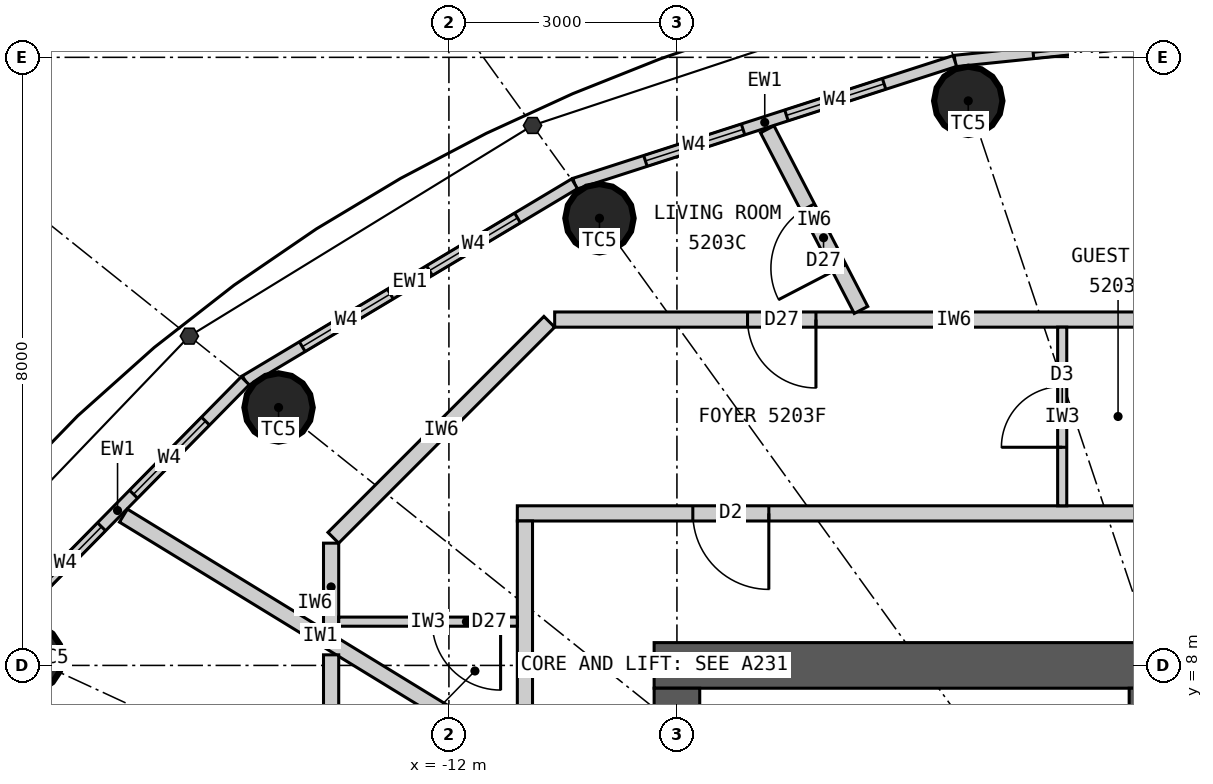
"""IFC4 building model, lengths in metres.
Left out: names, types, materials, properties, quantities, classifications, styles, units other than length and angle.
Written with IfcOpenShell. Run it as: python <this file> out.ifc"""

import sys

from ifc_helpers import new_model, si_unit, direction, frame, frame_2d, origin, origin_2d, place, context, subcontext, project, spatial, rectangle, circle, extrude, element, fill, save


model = new_model("IFC4")
c1 = context("Model", 3, precision=1e-05, world=origin(), true_north=direction((0.0, 1.0)))
c2 = subcontext(c1, "Body", "Model", "MODEL_VIEW")
j1 = project(units=[si_unit("LENGTHUNIT", "METRE"), si_unit("PLANEANGLEUNIT", "RADIAN")], contexts=[c1])
p1 = place(None, origin())
s1 = spatial("IfcSite", under=j1, at=p1, CompositionType="ELEMENT")
p2 = place(p1, origin())
s2 = spatial("IfcBuilding", under=s1, at=p2, CompositionType="ELEMENT")
p3 = place(p2, frame((0.0, 0.0, 196.2)))
s3 = spatial("IfcBuildingStorey", under=s2, at=p3, CompositionType="ELEMENT", Elevation=196.2)
for number, where, z_axis, x_axis in (
    (1, (-5.167, 15.427, 0.0), (0.0, 0.0, 1.0), (1.0, 0.0, 0.0)),
    (2, (-10.019, 13.883, 0.0), (0.0, 0.0, 1.0), (1.0, 0.0, 0.0)),
    (3, (-14.241, 11.393, 0.0), (0.0, 0.0, 1.0), (1.0, 0.0, 0.0)),
    (4, (-17.532, 8.098, 0.0), (0.0, 0.0, 1.0), (1.0, 0.0, 0.0)),
):
    element("IfcColumn", number, at=place(p3, frame(where, z_axis=z_axis, x_axis=x_axis)), inside=s3, PredefinedType="COLUMN", context=c2, shape_type="SweptSolid", body=[
        extrude(circle(Radius=0.45, at=origin_2d()), origin(), (0.0, 0.0, 1.0), 3.3),
    ])
p4 = place(p3, frame((-9.3, 8.0, 0.0), z_axis=(0.0, 0.0, 1.0), x_axis=(1.0, 0.0, 0.0)))
e5 = element("IfcWall", 5, at=p4, inside=s3, PredefinedType="SHEAR", context=c2, shape_type="SweptSolid", body=[
    extrude(rectangle(XDim=18.6, YDim=0.6, at=frame_2d((9.3, 0.0))), origin(), (0.0, 0.0, 1.0), 3.3),
])
p5 = place(p4, frame((8.0, 0.0, 0.0)))
e6 = element("IfcOpeningElement", 6, at=p5, cuts=e5, PredefinedType="OPENING", context=c2, shape_type="SweptSolid", body=[
    extrude(rectangle(XDim=1.2, YDim=2.2, at=frame_2d((0.6, 1.1))), frame((0.0, 0.31, 0.0), z_axis=(0.0, -1.0, 0.0), x_axis=(1.0, 0.0, 0.0)), (0.0, 0.0, 1.0), 0.62),
])
p6 = place(p4, frame((15.6, 0.0, 0.0)))
e7 = element("IfcOpeningElement", 7, at=p6, cuts=e5, PredefinedType="OPENING", context=c2, shape_type="SweptSolid", body=[
    extrude(rectangle(XDim=0.9, YDim=2.2, at=frame_2d((0.45, 1.1))), frame((0.0, 0.31, 0.0), z_axis=(0.0, -1.0, 0.0), x_axis=(1.0, 0.0, 0.0)), (0.0, 0.0, 1.0), 0.62),
])
p7 = place(p3, frame((-9.0, 7.7, 0.0), z_axis=(0.0, 0.0, 1.0), x_axis=(0.0, -1.0, 0.0)))
e8 = element("IfcWall", 8, at=p7, inside=s3, PredefinedType="SHEAR", context=c2, shape_type="SweptSolid", body=[
    extrude(rectangle(XDim=15.4, YDim=0.6, at=frame_2d((7.7, 0.0))), origin(), (0.0, 0.0, 1.0), 3.3),
])
p8 = place(p7, frame((6.8, 0.0, 0.0)))
e9 = element("IfcOpeningElement", 9, at=p8, cuts=e8, PredefinedType="OPENING", context=c2, shape_type="SweptSolid", body=[
    extrude(rectangle(XDim=1.8, YDim=2.2, at=frame_2d((0.9, 1.1))), frame((0.0, 0.31, 0.0), z_axis=(0.0, -1.0, 0.0), x_axis=(1.0, 0.0, 0.0)), (0.0, 0.0, 1.0), 0.62),
])
p9 = place(p3, frame((-2.75, 4.5, 0.0), z_axis=(0.0, 0.0, 1.0), x_axis=(0.0, 1.0, 0.0)))
e10 = element("IfcWall", 10, at=p9, inside=s3, PredefinedType="SHEAR", context=c2, shape_type="SweptSolid", body=[
    extrude(rectangle(XDim=3.2, YDim=0.6, at=frame_2d((1.6, 0.0))), origin(), (0.0, 0.0, 1.0), 3.3),
])
p10 = place(p9, frame((0.925, 0.0, 0.0)))
e11 = element("IfcOpeningElement", 11, at=p10, cuts=e10, PredefinedType="OPENING", context=c2, shape_type="SweptSolid", body=[
    extrude(rectangle(XDim=1.1, YDim=2.2, at=frame_2d((0.55, 1.1))), frame((0.0, 0.31, 0.0), z_axis=(0.0, -1.0, 0.0), x_axis=(1.0, 0.0, 0.0)), (0.0, 0.0, 1.0), 0.62),
])
p11 = place(p3, frame((0.0, 16.5, 0.0), z_axis=(0.0, 0.0, 1.0), x_axis=(-0.994774574972, -0.102095763818, 0.0)))
e12 = element("IfcWall", 12, at=p11, inside=s3, PredefinedType="ELEMENTEDWALL", context=c2, shape_type="SweptSolid", body=[
    extrude(rectangle(XDim=5.371, YDim=0.15, at=frame_2d((2.686, 0.0))), origin(), (0.0, 0.0, 1.0), 3.12),
])
p12 = place(p11, frame((1.035, 0.0, 0.9)))
e13 = element("IfcOpeningElement", 13, at=p12, cuts=e12, PredefinedType="OPENING", context=c2, shape_type="SweptSolid", body=[
    extrude(rectangle(XDim=1.35, YDim=1.9, at=frame_2d((0.675, 0.95))), frame((0.0, 0.085, 0.0), z_axis=(0.0, -1.0, 0.0), x_axis=(1.0, 0.0, 0.0)), (0.0, 0.0, 1.0), 0.17),
])
p13 = place(p11, frame((2.985, 0.0, 0.9)))
e14 = element("IfcOpeningElement", 14, at=p13, cuts=e12, PredefinedType="OPENING", context=c2, shape_type="SweptSolid", body=[
    extrude(rectangle(XDim=1.35, YDim=1.9, at=frame_2d((0.675, 0.95))), frame((0.0, 0.085, 0.0), z_axis=(0.0, -1.0, 0.0), x_axis=(1.0, 0.0, 0.0)), (0.0, 0.0, 1.0), 0.17),
])
p14 = place(p3, frame((-5.343, 15.952, 0.0), z_axis=(0.0, 0.0, 1.0), x_axis=(-0.951644702515, -0.307200846638, 0.0)))
e15 = element("IfcWall", 15, at=p14, inside=s3, PredefinedType="ELEMENTEDWALL", context=c2, shape_type="SweptSolid", body=[
    extrude(rectangle(XDim=5.258, YDim=0.15, at=frame_2d((2.629, 0.0))), origin(), (0.0, 0.0, 1.0), 3.12),
])
p15 = place(p14, frame((0.979, 0.0, 0.9)))
e16 = element("IfcOpeningElement", 16, at=p15, cuts=e15, PredefinedType="OPENING", context=c2, shape_type="SweptSolid", body=[
    extrude(rectangle(XDim=1.35, YDim=1.9, at=frame_2d((0.675, 0.95))), frame((0.0, 0.085, 0.0), z_axis=(0.0, -1.0, 0.0), x_axis=(1.0, 0.0, 0.0)), (0.0, 0.0, 1.0), 0.17),
])
p16 = place(p14, frame((2.929, 0.0, 0.9)))
e17 = element("IfcOpeningElement", 17, at=p16, cuts=e15, PredefinedType="OPENING", context=c2, shape_type="SweptSolid", body=[
    extrude(rectangle(XDim=1.35, YDim=1.9, at=frame_2d((0.675, 0.95))), frame((0.0, 0.085, 0.0), z_axis=(0.0, -1.0, 0.0), x_axis=(1.0, 0.0, 0.0)), (0.0, 0.0, 1.0), 0.17),
])
p17 = place(p3, frame((-10.346, 14.336, 0.0), z_axis=(0.0, 0.0, 1.0), x_axis=(-0.85822150553, -0.513279502265, 0.0)))
e18 = element("IfcWall", 18, at=p17, inside=s3, PredefinedType="ELEMENTEDWALL", context=c2, shape_type="SweptSolid", body=[
    extrude(rectangle(XDim=5.05, YDim=0.15, at=frame_2d((2.525, 0.0))), origin(), (0.0, 0.0, 1.0), 3.12),
])
p18 = place(p17, frame((0.875, 0.0, 0.9)))
e19 = element("IfcOpeningElement", 19, at=p18, cuts=e18, PredefinedType="OPENING", context=c2, shape_type="SweptSolid", body=[
    extrude(rectangle(XDim=1.35, YDim=1.9, at=frame_2d((0.675, 0.95))), frame((0.0, 0.085, 0.0), z_axis=(0.0, -1.0, 0.0), x_axis=(1.0, 0.0, 0.0)), (0.0, 0.0, 1.0), 0.17),
])
p19 = place(p17, frame((2.825, 0.0, 0.9)))
e20 = element("IfcOpeningElement", 20, at=p19, cuts=e18, PredefinedType="OPENING", context=c2, shape_type="SweptSolid", body=[
    extrude(rectangle(XDim=1.35, YDim=1.9, at=frame_2d((0.675, 0.95))), frame((0.0, 0.085, 0.0), z_axis=(0.0, -1.0, 0.0), x_axis=(1.0, 0.0, 0.0)), (0.0, 0.0, 1.0), 0.17),
])
p20 = place(p3, frame((-14.68, 11.744, 0.0), z_axis=(0.0, 0.0, 1.0), x_axis=(-0.701527379618, -0.712642501993, 0.0)))
e21 = element("IfcWall", 21, at=p20, inside=s3, PredefinedType="ELEMENTEDWALL", context=c2, shape_type="SweptSolid", body=[
    extrude(rectangle(XDim=4.788, YDim=0.15, at=frame_2d((2.394, 0.0))), origin(), (0.0, 0.0, 1.0), 3.12),
])
p21 = place(p20, frame((0.744, 0.0, 0.9)))
e22 = element("IfcOpeningElement", 22, at=p21, cuts=e21, PredefinedType="OPENING", context=c2, shape_type="SweptSolid", body=[
    extrude(rectangle(XDim=1.35, YDim=1.9, at=frame_2d((0.675, 0.95))), frame((0.0, 0.085, 0.0), z_axis=(0.0, -1.0, 0.0), x_axis=(1.0, 0.0, 0.0)), (0.0, 0.0, 1.0), 0.17),
])
p22 = place(p20, frame((2.694, 0.0, 0.9)))
e23 = element("IfcOpeningElement", 23, at=p22, cuts=e21, PredefinedType="OPENING", context=c2, shape_type="SweptSolid", body=[
    extrude(rectangle(XDim=1.35, YDim=1.9, at=frame_2d((0.675, 0.95))), frame((0.0, 0.085, 0.0), z_axis=(0.0, -1.0, 0.0), x_axis=(1.0, 0.0, 0.0)), (0.0, 0.0, 1.0), 0.17),
])
p23 = place(p3, frame((-11.1, 10.0, 0.0), z_axis=(0.0, 0.0, 1.0), x_axis=(1.0, 0.0, 0.0)))
e24 = element("IfcWall", 24, at=p23, inside=s3, PredefinedType="PARTITIONING", context=c2, shape_type="SweptSolid", body=[
    extrude(rectangle(XDim=22.2, YDim=0.2, at=frame_2d((11.1, 0.0))), origin(), (0.0, 0.0, 1.0), 3.12),
])
p24 = place(p23, frame((2.309, 0.0, 0.0)))
e25 = element("IfcOpeningElement", 25, at=p24, cuts=e24, PredefinedType="OPENING", context=c2, shape_type="SweptSolid", body=[
    extrude(rectangle(XDim=1.0, YDim=2.2, at=frame_2d((0.5, 1.1))), frame((0.0, 0.11, 0.0), z_axis=(0.0, -1.0, 0.0), x_axis=(1.0, 0.0, 0.0)), (0.0, 0.0, 1.0), 0.22),
])
p25 = place(p3, frame((-11.0, 9.9, 0.0), z_axis=(0.0, 0.0, 1.0), x_axis=(0.0, -1.0, 0.0)))
e26 = element("IfcWall", 26, at=p25, inside=s3, PredefinedType="PARTITIONING", context=c2, shape_type="SweptSolid", body=[
    extrude(rectangle(XDim=7.416, YDim=0.2, at=frame_2d((3.708, 0.0))), origin(), (0.0, 0.0, 1.0), 3.12),
])
p26 = place(p3, frame((-11.1, 6.797, 0.0), z_axis=(0.0, 0.0, 1.0), x_axis=(-0.852799818179, 0.522237943963, 0.0)))
e27 = element("IfcWall", 27, at=p26, inside=s3, PredefinedType="PARTITIONING", context=c2, shape_type="SweptSolid", body=[
    extrude(rectangle(XDim=6.077, YDim=0.2, at=frame_2d((3.039, 0.0))), origin(), (0.0, 0.0, 1.0), 3.12),
])
p27 = place(p3, frame((-0.101, 12.55, 0.0), z_axis=(0.0, 0.0, 1.0), x_axis=(-1.0, 0.0, 0.0)))
e28 = element("IfcWall", 28, at=p27, inside=s3, PredefinedType="PARTITIONING", context=c2, shape_type="SweptSolid", body=[
    extrude(rectangle(XDim=10.508, YDim=0.2, at=frame_2d((5.254, 0.0))), origin(), (0.0, 0.0, 1.0), 3.12),
])
p28 = place(p27, frame((1.4, 0.0, 0.0)))
e29 = element("IfcOpeningElement", 29, at=p28, cuts=e28, PredefinedType="OPENING", context=c2, shape_type="SweptSolid", body=[
    extrude(rectangle(XDim=0.8, YDim=2.1, at=frame_2d((0.4, 1.05))), frame((0.0, 0.11, 0.0), z_axis=(0.0, -1.0, 0.0), x_axis=(1.0, 0.0, 0.0)), (0.0, 0.0, 1.0), 0.22),
])
p29 = place(p27, frame((7.07, 0.0, 0.0)))
e30 = element("IfcOpeningElement", 30, at=p29, cuts=e28, PredefinedType="OPENING", context=c2, shape_type="SweptSolid", body=[
    extrude(rectangle(XDim=0.9, YDim=2.1, at=frame_2d((0.45, 1.05))), frame((0.0, 0.11, 0.0), z_axis=(0.0, -1.0, 0.0), x_axis=(1.0, 0.0, 0.0)), (0.0, 0.0, 1.0), 0.22),
])
p30 = place(p3, frame((-10.679, 12.521, 0.0), z_axis=(0.0, 0.0, 1.0), x_axis=(-0.707106781187, -0.707106781187, 0.0)))
e31 = element("IfcWall", 31, at=p30, inside=s3, PredefinedType="PARTITIONING", context=c2, shape_type="SweptSolid", body=[
    extrude(rectangle(XDim=4.019, YDim=0.2, at=frame_2d((2.009, 0.0))), origin(), (0.0, 0.0, 1.0), 3.12),
])
p31 = place(p3, frame((-13.55, 9.609, 0.0), z_axis=(0.0, 0.0, 1.0), x_axis=(0.0, -1.0, 0.0)))
e32 = element("IfcWall", 32, at=p31, inside=s3, PredefinedType="PARTITIONING", context=c2, shape_type="SweptSolid", body=[
    extrude(rectangle(XDim=1.153, YDim=0.2, at=frame_2d((0.576, 0.0))), origin(), (0.0, 0.0, 1.0), 3.12),
])
p32 = place(p3, frame((-6.578, 12.677, 0.0), z_axis=(0.0, 0.0, 1.0), x_axis=(-0.460620531465, 0.887597164255, 0.0)))
e33 = element("IfcWall", 33, at=p32, inside=s3, PredefinedType="PARTITIONING", context=c2, shape_type="SweptSolid", body=[
    extrude(rectangle(XDim=2.678, YDim=0.2, at=frame_2d((1.339, 0.0))), origin(), (0.0, 0.0, 1.0), 3.12),
])
p33 = place(p32, frame((0.62, 0.0, 0.0)))
e34 = element("IfcOpeningElement", 34, at=p33, cuts=e33, PredefinedType="OPENING", context=c2, shape_type="SweptSolid", body=[
    extrude(rectangle(XDim=0.9, YDim=2.1, at=frame_2d((0.45, 1.05))), frame((0.0, 0.11, 0.0), z_axis=(0.0, -1.0, 0.0), x_axis=(1.0, 0.0, 0.0)), (0.0, 0.0, 1.0), 0.22),
])
p34 = place(p3, frame((-3.931, 10.1, 0.0), z_axis=(0.0, 0.0, 1.0), x_axis=(0.0, 1.0, 0.0)))
e35 = element("IfcWall", 35, at=p34, inside=s3, PredefinedType="PARTITIONING", context=c2, shape_type="SweptSolid", body=[
    extrude(rectangle(XDim=2.35, YDim=0.12, at=frame_2d((1.175, 0.0))), origin(), (0.0, 0.0, 1.0), 3.12),
])
p35 = place(p34, frame((0.77, 0.0, 0.0)))
e36 = element("IfcOpeningElement", 36, at=p35, cuts=e35, PredefinedType="OPENING", context=c2, shape_type="SweptSolid", body=[
    extrude(rectangle(XDim=0.8, YDim=2.1, at=frame_2d((0.4, 1.05))), frame((0.0, 0.07, 0.0), z_axis=(0.0, -1.0, 0.0), x_axis=(1.0, 0.0, 0.0)), (0.0, 0.0, 1.0), 0.14),
])
p36 = place(p3, frame((-11.1, 8.576, 0.0), z_axis=(0.0, 0.0, 1.0), x_axis=(-1.0, 0.0, 0.0)))
e37 = element("IfcWall", 37, at=p36, inside=s3, PredefinedType="PARTITIONING", context=c2, shape_type="SweptSolid", body=[
    extrude(rectangle(XDim=2.35, YDim=0.12, at=frame_2d((1.175, 0.0))), origin(), (0.0, 0.0, 1.0), 3.12),
])
p37 = place(p36, frame((0.22, 0.0, 0.0)))
e38 = element("IfcOpeningElement", 38, at=p37, cuts=e37, PredefinedType="OPENING", context=c2, shape_type="SweptSolid", body=[
    extrude(rectangle(XDim=0.9, YDim=2.1, at=frame_2d((0.45, 1.05))), frame((0.0, 0.07, 0.0), z_axis=(0.0, -1.0, 0.0), x_axis=(1.0, 0.0, 0.0)), (0.0, 0.0, 1.0), 0.14),
])
p38 = place(p3, frame((-13.55, 8.139, 0.0), z_axis=(0.0, 0.0, 1.0), x_axis=(0.0, -1.0, 0.0)))
e39 = element("IfcWall", 39, at=p38, inside=s3, PredefinedType="PARTITIONING", context=c2, shape_type="SweptSolid", body=[
    extrude(rectangle(XDim=12.496, YDim=0.2, at=frame_2d((6.248, 0.0))), origin(), (0.0, 0.0, 1.0), 3.12),
])
p39 = place(p38, frame((2.42, 0.0, 0.0)))
e40 = element("IfcOpeningElement", 40, at=p39, cuts=e39, PredefinedType="OPENING", context=c2, shape_type="SweptSolid", body=[
    extrude(rectangle(XDim=0.8, YDim=2.1, at=frame_2d((0.4, 1.05))), frame((0.0, 0.11, 0.0), z_axis=(0.0, -1.0, 0.0), x_axis=(1.0, 0.0, 0.0)), (0.0, 0.0, 1.0), 0.22),
])
p40 = place(p38, frame((9.776, 0.0, 0.0)))
e41 = element("IfcOpeningElement", 41, at=p40, cuts=e39, PredefinedType="OPENING", context=c2, shape_type="SweptSolid", body=[
    extrude(rectangle(XDim=0.8, YDim=2.1, at=frame_2d((0.4, 1.05))), frame((0.0, 0.11, 0.0), z_axis=(0.0, -1.0, 0.0), x_axis=(1.0, 0.0, 0.0)), (0.0, 0.0, 1.0), 0.22),
])
p41 = place(p38, frame((5.82, 0.0, 0.0)))
e42 = element("IfcOpeningElement", 42, at=p41, cuts=e39, PredefinedType="OPENING", context=c2, shape_type="SweptSolid", body=[
    extrude(rectangle(XDim=0.9, YDim=2.1, at=frame_2d((0.45, 1.05))), frame((0.0, 0.11, 0.0), z_axis=(0.0, -1.0, 0.0), x_axis=(1.0, 0.0, 0.0)), (0.0, 0.0, 1.0), 0.22),
])
p42 = place(p13, origin())
e43 = element("IfcWindow", 43, at=p42, inside=s3, PartitioningType="SINGLE_PANEL", PredefinedType="WINDOW", context=c2, shape_type="SweptSolid", body=[
    extrude(rectangle(XDim=1.35, YDim=1.9, at=frame_2d((0.675, 0.95))), frame((0.0, 0.03, 0.0), z_axis=(0.0, -1.0, 0.0), x_axis=(1.0, 0.0, 0.0)), (0.0, 0.0, 1.0), 0.06),
])
fill(e14, e43)
p43 = place(p15, origin())
e44 = element("IfcWindow", 44, at=p43, inside=s3, PartitioningType="SINGLE_PANEL", PredefinedType="WINDOW", context=c2, shape_type="SweptSolid", body=[
    extrude(rectangle(XDim=1.35, YDim=1.9, at=frame_2d((0.675, 0.95))), frame((0.0, 0.03, 0.0), z_axis=(0.0, -1.0, 0.0), x_axis=(1.0, 0.0, 0.0)), (0.0, 0.0, 1.0), 0.06),
])
fill(e16, e44)
p44 = place(p16, origin())
e45 = element("IfcWindow", 45, at=p44, inside=s3, PartitioningType="SINGLE_PANEL", PredefinedType="WINDOW", context=c2, shape_type="SweptSolid", body=[
    extrude(rectangle(XDim=1.35, YDim=1.9, at=frame_2d((0.675, 0.95))), frame((0.0, 0.03, 0.0), z_axis=(0.0, -1.0, 0.0), x_axis=(1.0, 0.0, 0.0)), (0.0, 0.0, 1.0), 0.06),
])
fill(e17, e45)
p45 = place(p18, origin())
e46 = element("IfcWindow", 46, at=p45, inside=s3, PartitioningType="SINGLE_PANEL", PredefinedType="WINDOW", context=c2, shape_type="SweptSolid", body=[
    extrude(rectangle(XDim=1.35, YDim=1.9, at=frame_2d((0.675, 0.95))), frame((0.0, 0.03, 0.0), z_axis=(0.0, -1.0, 0.0), x_axis=(1.0, 0.0, 0.0)), (0.0, 0.0, 1.0), 0.06),
])
fill(e19, e46)
p46 = place(p19, origin())
e47 = element("IfcWindow", 47, at=p46, inside=s3, PartitioningType="SINGLE_PANEL", PredefinedType="WINDOW", context=c2, shape_type="SweptSolid", body=[
    extrude(rectangle(XDim=1.35, YDim=1.9, at=frame_2d((0.675, 0.95))), frame((0.0, 0.03, 0.0), z_axis=(0.0, -1.0, 0.0), x_axis=(1.0, 0.0, 0.0)), (0.0, 0.0, 1.0), 0.06),
])
fill(e20, e47)
p47 = place(p21, origin())
e48 = element("IfcWindow", 48, at=p47, inside=s3, PartitioningType="SINGLE_PANEL", PredefinedType="WINDOW", context=c2, shape_type="SweptSolid", body=[
    extrude(rectangle(XDim=1.35, YDim=1.9, at=frame_2d((0.675, 0.95))), frame((0.0, 0.03, 0.0), z_axis=(0.0, -1.0, 0.0), x_axis=(1.0, 0.0, 0.0)), (0.0, 0.0, 1.0), 0.06),
])
fill(e22, e48)
p48 = place(p22, origin())
e49 = element("IfcWindow", 49, at=p48, inside=s3, PartitioningType="SINGLE_PANEL", PredefinedType="WINDOW", context=c2, shape_type="SweptSolid", body=[
    extrude(rectangle(XDim=1.35, YDim=1.9, at=frame_2d((0.675, 0.95))), frame((0.0, 0.03, 0.0), z_axis=(0.0, -1.0, 0.0), x_axis=(1.0, 0.0, 0.0)), (0.0, 0.0, 1.0), 0.06),
])
fill(e23, e49)
p49 = place(p24, origin())
e50 = element("IfcDoor", 50, at=p49, inside=s3, OperationType="SINGLE_SWING_RIGHT", PredefinedType="DOOR", context=c2, shape_type="SweptSolid", body=[
    extrude(rectangle(XDim=1.0, YDim=2.2, at=frame_2d((0.5, 1.1))), frame((0.0, 0.025, 0.0), z_axis=(0.0, -1.0, 0.0), x_axis=(1.0, 0.0, 0.0)), (0.0, 0.0, 1.0), 0.05),
])
fill(e25, e50)
p50 = place(p35, origin())
e51 = element("IfcDoor", 51, at=p50, inside=s3, OperationType="SINGLE_SWING_LEFT", PredefinedType="DOOR", context=c2, shape_type="SweptSolid", body=[
    extrude(rectangle(XDim=0.8, YDim=2.1, at=frame_2d((0.4, 1.05))), frame((0.0, 0.025, 0.0), z_axis=(0.0, -1.0, 0.0), x_axis=(1.0, 0.0, 0.0)), (0.0, 0.0, 1.0), 0.05),
])
fill(e36, e51)
p51 = place(p37, origin())
e52 = element("IfcDoor", 52, at=p51, inside=s3, OperationType="SINGLE_SWING_LEFT", PredefinedType="DOOR", context=c2, shape_type="SweptSolid", body=[
    extrude(rectangle(XDim=0.9, YDim=2.1, at=frame_2d((0.45, 1.05))), frame((0.0, 0.025, 0.0), z_axis=(0.0, -1.0, 0.0), x_axis=(1.0, 0.0, 0.0)), (0.0, 0.0, 1.0), 0.05),
])
fill(e38, e52)
p52 = place(p29, origin())
e53 = element("IfcDoor", 53, at=p52, inside=s3, OperationType="SINGLE_SWING_LEFT", PredefinedType="DOOR", context=c2, shape_type="SweptSolid", body=[
    extrude(rectangle(XDim=0.9, YDim=2.1, at=frame_2d((0.45, 1.05))), frame((0.0, 0.025, 0.0), z_axis=(0.0, -1.0, 0.0), x_axis=(1.0, 0.0, 0.0)), (0.0, 0.0, 1.0), 0.05),
])
fill(e30, e53)
p53 = place(p33, origin())
e54 = element("IfcDoor", 54, at=p53, inside=s3, OperationType="SINGLE_SWING_LEFT", PredefinedType="DOOR", context=c2, shape_type="SweptSolid", body=[
    extrude(rectangle(XDim=0.9, YDim=2.1, at=frame_2d((0.45, 1.05))), frame((0.0, 0.025, 0.0), z_axis=(0.0, -1.0, 0.0), x_axis=(1.0, 0.0, 0.0)), (0.0, 0.0, 1.0), 0.05),
])
fill(e34, e54)
save(model, sys.argv[1])
